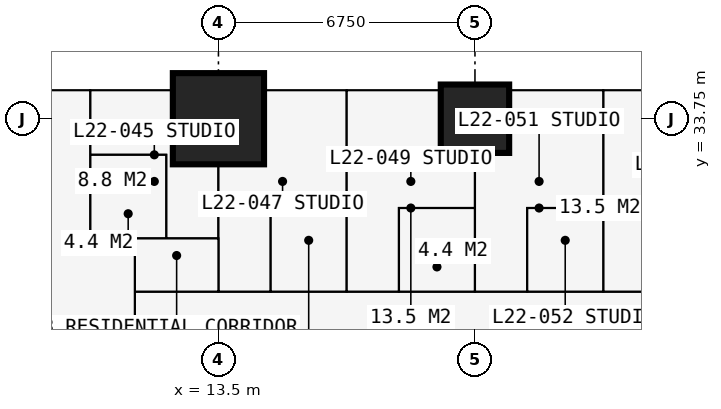
"""IFC4 building model, lengths in metres.
Left out: names, types, materials, properties, quantities, classifications, styles, units other than length and angle.
Written with IfcOpenShell. Run it as: python <this file> out.ifc"""

import sys

from ifc_helpers import new_model, si_unit, direction, frame, frame_2d, origin, origin_2d, place, context, subcontext, project, spatial, rectangle, extrude, element, fill, save


model = new_model("IFC4")
c1 = context("Model", 3, precision=1e-05, world=origin(), true_north=direction((0.0, 1.0)))
c2 = subcontext(c1, "Body", "Model", "MODEL_VIEW")
j1 = project(units=[si_unit("LENGTHUNIT", "METRE"), si_unit("PLANEANGLEUNIT", "RADIAN")], contexts=[c1])
p1 = place(None, origin())
s1 = spatial("IfcSite", under=j1, at=p1, CompositionType="ELEMENT")
p2 = place(p1, origin())
s2 = spatial("IfcBuilding", under=s1, at=p2, CompositionType="ELEMENT")
p3 = place(p2, frame((0.0, 0.0, 83.7)))
s3 = spatial("IfcBuildingStorey", under=s2, at=p3, CompositionType="ELEMENT", Elevation=83.7)
p4 = place(p3, frame((13.5, 33.75, 0.0), z_axis=(0.0, 0.0, 1.0), x_axis=(1.0, 0.0, 0.0)))
e1 = element("IfcColumn", 1, at=p4, inside=s3, PredefinedType="COLUMN", context=c2, shape_type="SweptSolid", body=[
    extrude(rectangle(XDim=2.4, YDim=2.4, at=origin_2d()), origin(), (0.0, 0.0, 1.0), 3.6),
])
p5 = place(p3, frame((20.25, 33.75, 0.0), z_axis=(0.0, 0.0, 1.0), x_axis=(1.0, 0.0, 0.0)))
e2 = element("IfcColumn", 2, at=p5, inside=s3, PredefinedType="COLUMN", context=c2, shape_type="SweptSolid", body=[
    extrude(rectangle(XDim=1.8, YDim=1.8, at=origin_2d()), origin(), (0.0, 0.0, 1.0), 3.6),
])
p6 = place(p3, frame((20.25, 34.5, 0.0), z_axis=(0.0, 0.0, 1.0), x_axis=(1.0, 0.0, 0.0)))
e3 = element("IfcWall", 3, at=p6, inside=s3, PredefinedType="SOLIDWALL", context=c2, shape_type="SweptSolid", body=[
    extrude(rectangle(XDim=6.75, YDim=0.15, at=frame_2d((3.375, 0.0))), origin(), (0.0, 0.0, 1.0), 3.375),
])
p7 = place(p6, frame((0.962, 0.0, 0.0)))
e4 = element("IfcOpeningElement", 4, at=p7, cuts=e3, PredefinedType="OPENING", context=c2, shape_type="SweptSolid", body=[
    extrude(rectangle(XDim=1.0, YDim=2.2, at=frame_2d((0.5, 1.1))), frame((0.0, 0.085, 0.0), z_axis=(0.0, -1.0, 0.0), x_axis=(1.0, 0.0, 0.0)), (0.0, 0.0, 1.0), 0.17),
])
p8 = place(p6, frame((2.025, 0.0, 0.9)))
e5 = element("IfcOpeningElement", 5, at=p8, cuts=e3, PredefinedType="OPENING", context=c2, shape_type="SweptSolid", body=[
    extrude(rectangle(XDim=1.2, YDim=1.8, at=frame_2d((0.6, 0.9))), frame((0.0, 0.085, 0.0), z_axis=(0.0, -1.0, 0.0), x_axis=(1.0, 0.0, 0.0)), (0.0, 0.0, 1.0), 0.17),
])
p9 = place(p6, frame((4.488, 0.0, 0.0)))
e6 = element("IfcOpeningElement", 6, at=p9, cuts=e3, PredefinedType="OPENING", context=c2, shape_type="SweptSolid", body=[
    extrude(rectangle(XDim=1.0, YDim=2.2, at=frame_2d((0.5, 1.1))), frame((0.0, 0.085, 0.0), z_axis=(0.0, -1.0, 0.0), x_axis=(1.0, 0.0, 0.0)), (0.0, 0.0, 1.0), 0.17),
])
p10 = place(p6, frame((3.525, 0.0, 0.9)))
e7 = element("IfcOpeningElement", 7, at=p10, cuts=e3, PredefinedType="OPENING", context=c2, shape_type="SweptSolid", body=[
    extrude(rectangle(XDim=0.9, YDim=1.8, at=frame_2d((0.45, 0.9))), frame((0.0, 0.085, 0.0), z_axis=(0.0, -1.0, 0.0), x_axis=(1.0, 0.0, 0.0)), (0.0, 0.0, 1.0), 0.17),
])
p11 = place(p3, frame((23.625, 34.6, 0.0), z_axis=(0.0, 0.0, 1.0), x_axis=(0.0, 1.0, 0.0)))
e8 = element("IfcWall", 8, at=p11, inside=s3, PredefinedType="USERDEFINED", context=c2, shape_type="SweptSolid", body=[
    extrude(rectangle(XDim=2.2, YDim=1.0, at=frame_2d((1.1, 0.0))), origin(), (0.0, 0.0, 1.0), 0.9),
])
p12 = place(p3, frame((10.125, 30.6, 0.0), z_axis=(0.0, 0.0, 1.0), x_axis=(0.0, 1.0, 0.0)))
e9 = element("IfcWall", 9, at=p12, inside=s3, PredefinedType="PARTITIONING", context=c2, shape_type="SweptSolid", body=[
    extrude(rectangle(XDim=3.884, YDim=0.1, at=frame_2d((1.942, 0.0))), origin(), (0.0, 0.0, 1.0), 3.375),
])
p13 = place(p3, frame((10.125, 30.6, 0.0), z_axis=(0.0, 0.0, 1.0), x_axis=(1.0, 0.0, 0.0)))
e10 = element("IfcWall", 10, at=p13, inside=s3, PredefinedType="PARTITIONING", context=c2, shape_type="SweptSolid", body=[
    extrude(rectangle(XDim=3.375, YDim=0.1, at=frame_2d((1.688, 0.0))), origin(), (0.0, 0.0, 1.0), 3.375),
])
p14 = place(p13, frame((2.2, 0.0, 0.0)))
e11 = element("IfcOpeningElement", 11, at=p14, cuts=e10, PredefinedType="OPENING", context=c2, shape_type="SweptSolid", body=[
    extrude(rectangle(XDim=0.95, YDim=2.2, at=frame_2d((0.475, 1.1))), frame((0.0, 0.06, 0.0), z_axis=(0.0, -1.0, 0.0), x_axis=(1.0, 0.0, 0.0)), (0.0, 0.0, 1.0), 0.12),
])
p15 = place(p3, frame((10.125, 32.8, 0.0), z_axis=(0.0, 0.0, 1.0), x_axis=(1.0, 0.0, 0.0)))
e12 = element("IfcWall", 12, at=p15, inside=s3, PredefinedType="PARTITIONING", context=c2, shape_type="SweptSolid", body=[
    extrude(rectangle(XDim=2.0, YDim=0.1, at=frame_2d((1.0, 0.0))), origin(), (0.0, 0.0, 1.0), 3.375),
])
p16 = place(p3, frame((11.3, 11.3, 0.0), z_axis=(0.0, 0.0, 1.0), x_axis=(0.0, 1.0, 0.0)))
e13 = element("IfcWall", 13, at=p16, inside=s3, PredefinedType="PARTITIONING", context=c2, shape_type="SweptSolid", body=[
    extrude(rectangle(XDim=19.3, YDim=0.15, at=frame_2d((9.65, 0.0))), origin(), (0.0, 0.0, 1.0), 3.375),
])
p17 = place(p16, frame((13.525, 0.0, 0.0)))
e14 = element("IfcOpeningElement", 14, at=p17, cuts=e13, PredefinedType="OPENING", context=c2, shape_type="SweptSolid", body=[
    extrude(rectangle(XDim=1.0, YDim=2.2, at=frame_2d((0.5, 1.1))), frame((0.0, 0.085, 0.0), z_axis=(0.0, -1.0, 0.0), x_axis=(1.0, 0.0, 0.0)), (0.0, 0.0, 1.0), 0.17),
])
p18 = place(p16, frame((10.438, 0.0, 0.0)))
e15 = element("IfcOpeningElement", 15, at=p18, cuts=e13, PredefinedType="OPENING", context=c2, shape_type="SweptSolid", body=[
    extrude(rectangle(XDim=1.0, YDim=2.2, at=frame_2d((0.5, 1.1))), frame((0.0, 0.085, 0.0), z_axis=(0.0, -1.0, 0.0), x_axis=(1.0, 0.0, 0.0)), (0.0, 0.0, 1.0), 0.17),
])
p19 = place(p3, frame((11.3, 29.2, 0.0), z_axis=(0.0, 0.0, 1.0), x_axis=(1.0, 0.0, 0.0)))
e16 = element("IfcWall", 16, at=p19, inside=s3, PredefinedType="PARTITIONING", context=c2, shape_type="SweptSolid", body=[
    extrude(rectangle(XDim=19.075, YDim=0.15, at=frame_2d((9.538, 0.0))), origin(), (0.0, 0.0, 1.0), 3.375),
])
p20 = place(p19, frame((5.825, 0.0, 0.0)))
e17 = element("IfcOpeningElement", 17, at=p20, cuts=e16, PredefinedType="OPENING", context=c2, shape_type="SweptSolid", body=[
    extrude(rectangle(XDim=0.95, YDim=2.2, at=frame_2d((0.475, 1.1))), frame((0.0, 0.085, 0.0), z_axis=(0.0, -1.0, 0.0), x_axis=(1.0, 0.0, 0.0)), (0.0, 0.0, 1.0), 0.17),
])
p21 = place(p19, frame((9.2, 0.0, 0.0)))
e18 = element("IfcOpeningElement", 18, at=p21, cuts=e16, PredefinedType="OPENING", context=c2, shape_type="SweptSolid", body=[
    extrude(rectangle(XDim=0.95, YDim=2.2, at=frame_2d((0.475, 1.1))), frame((0.0, 0.085, 0.0), z_axis=(0.0, -1.0, 0.0), x_axis=(1.0, 0.0, 0.0)), (0.0, 0.0, 1.0), 0.17),
])
p22 = place(p19, frame((0.6, 0.0, 0.0)))
e19 = element("IfcOpeningElement", 19, at=p22, cuts=e16, PredefinedType="OPENING", context=c2, shape_type="SweptSolid", body=[
    extrude(rectangle(XDim=1.0, YDim=2.2, at=frame_2d((0.5, 1.1))), frame((0.0, 0.085, 0.0), z_axis=(0.0, -1.0, 0.0), x_axis=(1.0, 0.0, 0.0)), (0.0, 0.0, 1.0), 0.17),
])
p23 = place(p3, frame((12.125, 30.6, 0.0), z_axis=(0.0, 0.0, 1.0), x_axis=(0.0, 1.0, 0.0)))
e20 = element("IfcWall", 20, at=p23, inside=s3, PredefinedType="PARTITIONING", context=c2, shape_type="SweptSolid", body=[
    extrude(rectangle(XDim=2.2, YDim=0.1, at=frame_2d((1.1, 0.0))), origin(), (0.0, 0.0, 1.0), 3.375),
])
p24 = place(p23, frame((0.65, 0.0, 0.0)))
e21 = element("IfcOpeningElement", 21, at=p24, cuts=e20, PredefinedType="OPENING", context=c2, shape_type="SweptSolid", body=[
    extrude(rectangle(XDim=0.9, YDim=2.2, at=frame_2d((0.45, 1.1))), frame((0.0, 0.06, 0.0), z_axis=(0.0, -1.0, 0.0), x_axis=(1.0, 0.0, 0.0)), (0.0, 0.0, 1.0), 0.12),
])
p25 = place(p3, frame((13.5, 29.2, 0.0), z_axis=(0.0, 0.0, 1.0), x_axis=(0.0, 1.0, 0.0)))
e22 = element("IfcWall", 22, at=p25, inside=s3, PredefinedType="PARTITIONING", context=c2, shape_type="SweptSolid", body=[
    extrude(rectangle(XDim=5.284, YDim=0.175, at=frame_2d((2.642, 0.0))), origin(), (0.0, 0.0, 1.0), 2.61),
])
p26 = place(p25, frame((0.25, 0.0, 0.0)))
e23 = element("IfcOpeningElement", 23, at=p26, cuts=e22, PredefinedType="OPENING", context=c2, shape_type="SweptSolid", body=[
    extrude(rectangle(XDim=0.95, YDim=2.2, at=frame_2d((0.475, 1.1))), frame((0.0, 0.097, 0.0), z_axis=(0.0, -1.0, 0.0), x_axis=(1.0, 0.0, 0.0)), (0.0, 0.0, 1.0), 0.195),
])
p27 = place(p3, frame((14.875, 29.2, 0.0), z_axis=(0.0, 0.0, 1.0), x_axis=(0.0, 1.0, 0.0)))
e24 = element("IfcWall", 24, at=p27, inside=s3, PredefinedType="PARTITIONING", context=c2, shape_type="SweptSolid", body=[
    extrude(rectangle(XDim=2.2, YDim=0.1, at=frame_2d((1.1, 0.0))), origin(), (0.0, 0.0, 1.0), 3.375),
])
p28 = place(p27, frame((0.65, 0.0, 0.0)))
e25 = element("IfcOpeningElement", 25, at=p28, cuts=e24, PredefinedType="OPENING", context=c2, shape_type="SweptSolid", body=[
    extrude(rectangle(XDim=0.9, YDim=2.2, at=frame_2d((0.45, 1.1))), frame((0.0, 0.06, 0.0), z_axis=(0.0, -1.0, 0.0), x_axis=(1.0, 0.0, 0.0)), (0.0, 0.0, 1.0), 0.12),
])
p29 = place(p3, frame((14.875, 31.4, 0.0), z_axis=(0.0, 0.0, 1.0), x_axis=(1.0, 0.0, 0.0)))
e26 = element("IfcWall", 26, at=p29, inside=s3, PredefinedType="PARTITIONING", context=c2, shape_type="SweptSolid", body=[
    extrude(rectangle(XDim=2.0, YDim=0.1, at=frame_2d((1.0, 0.0))), origin(), (0.0, 0.0, 1.0), 3.375),
])
p30 = place(p3, frame((16.875, 29.2, 0.0), z_axis=(0.0, 0.0, 1.0), x_axis=(0.0, 1.0, 0.0)))
e27 = element("IfcWall", 27, at=p30, inside=s3, PredefinedType="PARTITIONING", context=c2, shape_type="SweptSolid", body=[
    extrude(rectangle(XDim=5.284, YDim=0.175, at=frame_2d((2.642, 0.0))), origin(), (0.0, 0.0, 1.0), 3.375),
])
p31 = place(p3, frame((18.25, 29.2, 0.0), z_axis=(0.0, 0.0, 1.0), x_axis=(0.0, 1.0, 0.0)))
e28 = element("IfcWall", 28, at=p31, inside=s3, PredefinedType="PARTITIONING", context=c2, shape_type="SweptSolid", body=[
    extrude(rectangle(XDim=2.2, YDim=0.1, at=frame_2d((1.1, 0.0))), origin(), (0.0, 0.0, 1.0), 3.375),
])
p32 = place(p31, frame((0.65, 0.0, 0.0)))
e29 = element("IfcOpeningElement", 29, at=p32, cuts=e28, PredefinedType="OPENING", context=c2, shape_type="SweptSolid", body=[
    extrude(rectangle(XDim=0.9, YDim=2.2, at=frame_2d((0.45, 1.1))), frame((0.0, 0.06, 0.0), z_axis=(0.0, -1.0, 0.0), x_axis=(1.0, 0.0, 0.0)), (0.0, 0.0, 1.0), 0.12),
])
p33 = place(p3, frame((18.25, 31.4, 0.0), z_axis=(0.0, 0.0, 1.0), x_axis=(1.0, 0.0, 0.0)))
e30 = element("IfcWall", 30, at=p33, inside=s3, PredefinedType="PARTITIONING", context=c2, shape_type="SweptSolid", body=[
    extrude(rectangle(XDim=2.0, YDim=0.1, at=frame_2d((1.0, 0.0))), origin(), (0.0, 0.0, 1.0), 3.375),
])
p34 = place(p3, frame((20.25, 29.2, 0.0), z_axis=(0.0, 0.0, 1.0), x_axis=(0.0, 1.0, 0.0)))
e31 = element("IfcWall", 31, at=p34, inside=s3, PredefinedType="PARTITIONING", context=c2, shape_type="SweptSolid", body=[
    extrude(rectangle(XDim=5.284, YDim=0.175, at=frame_2d((2.642, 0.0))), origin(), (0.0, 0.0, 1.0), 2.61),
])
p35 = place(p3, frame((21.625, 29.2, 0.0), z_axis=(0.0, 0.0, 1.0), x_axis=(0.0, 1.0, 0.0)))
e32 = element("IfcWall", 32, at=p35, inside=s3, PredefinedType="PARTITIONING", context=c2, shape_type="SweptSolid", body=[
    extrude(rectangle(XDim=2.2, YDim=0.1, at=frame_2d((1.1, 0.0))), origin(), (0.0, 0.0, 1.0), 3.375),
])
p36 = place(p35, frame((0.65, 0.0, 0.0)))
e33 = element("IfcOpeningElement", 33, at=p36, cuts=e32, PredefinedType="OPENING", context=c2, shape_type="SweptSolid", body=[
    extrude(rectangle(XDim=0.9, YDim=2.2, at=frame_2d((0.45, 1.1))), frame((0.0, 0.06, 0.0), z_axis=(0.0, -1.0, 0.0), x_axis=(1.0, 0.0, 0.0)), (0.0, 0.0, 1.0), 0.12),
])
p37 = place(p3, frame((21.625, 31.4, 0.0), z_axis=(0.0, 0.0, 1.0), x_axis=(1.0, 0.0, 0.0)))
e34 = element("IfcWall", 34, at=p37, inside=s3, PredefinedType="PARTITIONING", context=c2, shape_type="SweptSolid", body=[
    extrude(rectangle(XDim=2.0, YDim=0.1, at=frame_2d((1.0, 0.0))), origin(), (0.0, 0.0, 1.0), 3.375),
])
p38 = place(p3, frame((23.625, 29.2, 0.0), z_axis=(0.0, 0.0, 1.0), x_axis=(0.0, 1.0, 0.0)))
e35 = element("IfcWall", 35, at=p38, inside=s3, PredefinedType="PARTITIONING", context=c2, shape_type="SweptSolid", body=[
    extrude(rectangle(XDim=5.284, YDim=0.15, at=frame_2d((2.642, 0.0))), origin(), (0.0, 0.0, 1.0), 3.375),
])
p39 = place(p7, origin())
e36 = element("IfcDoor", 36, at=p39, inside=s3, OperationType="SINGLE_SWING_LEFT", PredefinedType="DOOR", context=c2, shape_type="SweptSolid", body=[
    extrude(rectangle(XDim=1.0, YDim=2.2, at=frame_2d((0.5, 1.1))), frame((0.0, 0.025, 0.0), z_axis=(0.0, -1.0, 0.0), x_axis=(1.0, 0.0, 0.0)), (0.0, 0.0, 1.0), 0.05),
])
fill(e4, e36)
p40 = place(p8, origin())
e37 = element("IfcWindow", 37, at=p40, inside=s3, PartitioningType="SINGLE_PANEL", PredefinedType="WINDOW", context=c2, shape_type="SweptSolid", body=[
    extrude(rectangle(XDim=1.2, YDim=1.8, at=frame_2d((0.6, 0.9))), frame((0.0, 0.03, 0.0), z_axis=(0.0, -1.0, 0.0), x_axis=(1.0, 0.0, 0.0)), (0.0, 0.0, 1.0), 0.06),
])
fill(e5, e37)
p41 = place(p10, origin())
e38 = element("IfcWindow", 38, at=p41, inside=s3, PartitioningType="SINGLE_PANEL", PredefinedType="WINDOW", context=c2, shape_type="SweptSolid", body=[
    extrude(rectangle(XDim=0.9, YDim=1.8, at=frame_2d((0.45, 0.9))), frame((0.0, 0.03, 0.0), z_axis=(0.0, -1.0, 0.0), x_axis=(1.0, 0.0, 0.0)), (0.0, 0.0, 1.0), 0.06),
])
fill(e7, e38)
p42 = place(p14, origin())
e39 = element("IfcDoor", 39, at=p42, inside=s3, OperationType="SINGLE_SWING_LEFT", PredefinedType="DOOR", context=c2, shape_type="SweptSolid", body=[
    extrude(rectangle(XDim=0.95, YDim=2.2, at=frame_2d((0.475, 1.1))), frame((0.0, 0.025, 0.0), z_axis=(0.0, -1.0, 0.0), x_axis=(1.0, 0.0, 0.0)), (0.0, 0.0, 1.0), 0.05),
])
fill(e11, e39)
p43 = place(p24, origin())
e40 = element("IfcDoor", 40, at=p43, inside=s3, OperationType="SINGLE_SWING_RIGHT", PredefinedType="DOOR", context=c2, shape_type="SweptSolid", body=[
    extrude(rectangle(XDim=0.9, YDim=2.2, at=frame_2d((0.45, 1.1))), frame((0.0, 0.025, 0.0), z_axis=(0.0, -1.0, 0.0), x_axis=(1.0, 0.0, 0.0)), (0.0, 0.0, 1.0), 0.05),
])
fill(e21, e40)
p44 = place(p26, origin())
e41 = element("IfcDoor", 41, at=p44, inside=s3, OperationType="SINGLE_SWING_LEFT", PredefinedType="DOOR", context=c2, shape_type="SweptSolid", body=[
    extrude(rectangle(XDim=0.95, YDim=2.2, at=frame_2d((0.475, 1.1))), frame((0.0, 0.025, 0.0), z_axis=(0.0, -1.0, 0.0), x_axis=(1.0, 0.0, 0.0)), (0.0, 0.0, 1.0), 0.05),
])
fill(e23, e41)
p45 = place(p28, origin())
e42 = element("IfcDoor", 42, at=p45, inside=s3, OperationType="SINGLE_SWING_RIGHT", PredefinedType="DOOR", context=c2, shape_type="SweptSolid", body=[
    extrude(rectangle(XDim=0.9, YDim=2.2, at=frame_2d((0.45, 1.1))), frame((0.0, 0.025, 0.0), z_axis=(0.0, -1.0, 0.0), x_axis=(1.0, 0.0, 0.0)), (0.0, 0.0, 1.0), 0.05),
])
fill(e25, e42)
p46 = place(p20, origin())
e43 = element("IfcDoor", 43, at=p46, inside=s3, OperationType="SINGLE_SWING_LEFT", PredefinedType="DOOR", context=c2, shape_type="SweptSolid", body=[
    extrude(rectangle(XDim=0.95, YDim=2.2, at=frame_2d((0.475, 1.1))), frame((0.0, 0.025, 0.0), z_axis=(0.0, -1.0, 0.0), x_axis=(1.0, 0.0, 0.0)), (0.0, 0.0, 1.0), 0.05),
])
fill(e17, e43)
p47 = place(p32, origin())
e44 = element("IfcDoor", 44, at=p47, inside=s3, OperationType="SINGLE_SWING_RIGHT", PredefinedType="DOOR", context=c2, shape_type="SweptSolid", body=[
    extrude(rectangle(XDim=0.9, YDim=2.2, at=frame_2d((0.45, 1.1))), frame((0.0, 0.025, 0.0), z_axis=(0.0, -1.0, 0.0), x_axis=(1.0, 0.0, 0.0)), (0.0, 0.0, 1.0), 0.05),
])
fill(e29, e44)
p48 = place(p21, origin())
e45 = element("IfcDoor", 45, at=p48, inside=s3, OperationType="SINGLE_SWING_LEFT", PredefinedType="DOOR", context=c2, shape_type="SweptSolid", body=[
    extrude(rectangle(XDim=0.95, YDim=2.2, at=frame_2d((0.475, 1.1))), frame((0.0, 0.025, 0.0), z_axis=(0.0, -1.0, 0.0), x_axis=(1.0, 0.0, 0.0)), (0.0, 0.0, 1.0), 0.05),
])
fill(e18, e45)
p49 = place(p36, origin())
e46 = element("IfcDoor", 46, at=p49, inside=s3, OperationType="SINGLE_SWING_RIGHT", PredefinedType="DOOR", context=c2, shape_type="SweptSolid", body=[
    extrude(rectangle(XDim=0.9, YDim=2.2, at=frame_2d((0.45, 1.1))), frame((0.0, 0.025, 0.0), z_axis=(0.0, -1.0, 0.0), x_axis=(1.0, 0.0, 0.0)), (0.0, 0.0, 1.0), 0.05),
])
fill(e33, e46)
p50 = place(p22, origin())
e47 = element("IfcDoor", 47, at=p50, inside=s3, OperationType="SINGLE_SWING_LEFT", PredefinedType="DOOR", context=c2, shape_type="SweptSolid", body=[
    extrude(rectangle(XDim=1.0, YDim=2.2, at=frame_2d((0.5, 1.1))), frame((0.0, 0.025, 0.0), z_axis=(0.0, -1.0, 0.0), x_axis=(1.0, 0.0, 0.0)), (0.0, 0.0, 1.0), 0.05),
])
fill(e19, e47)
save(model, sys.argv[1])
